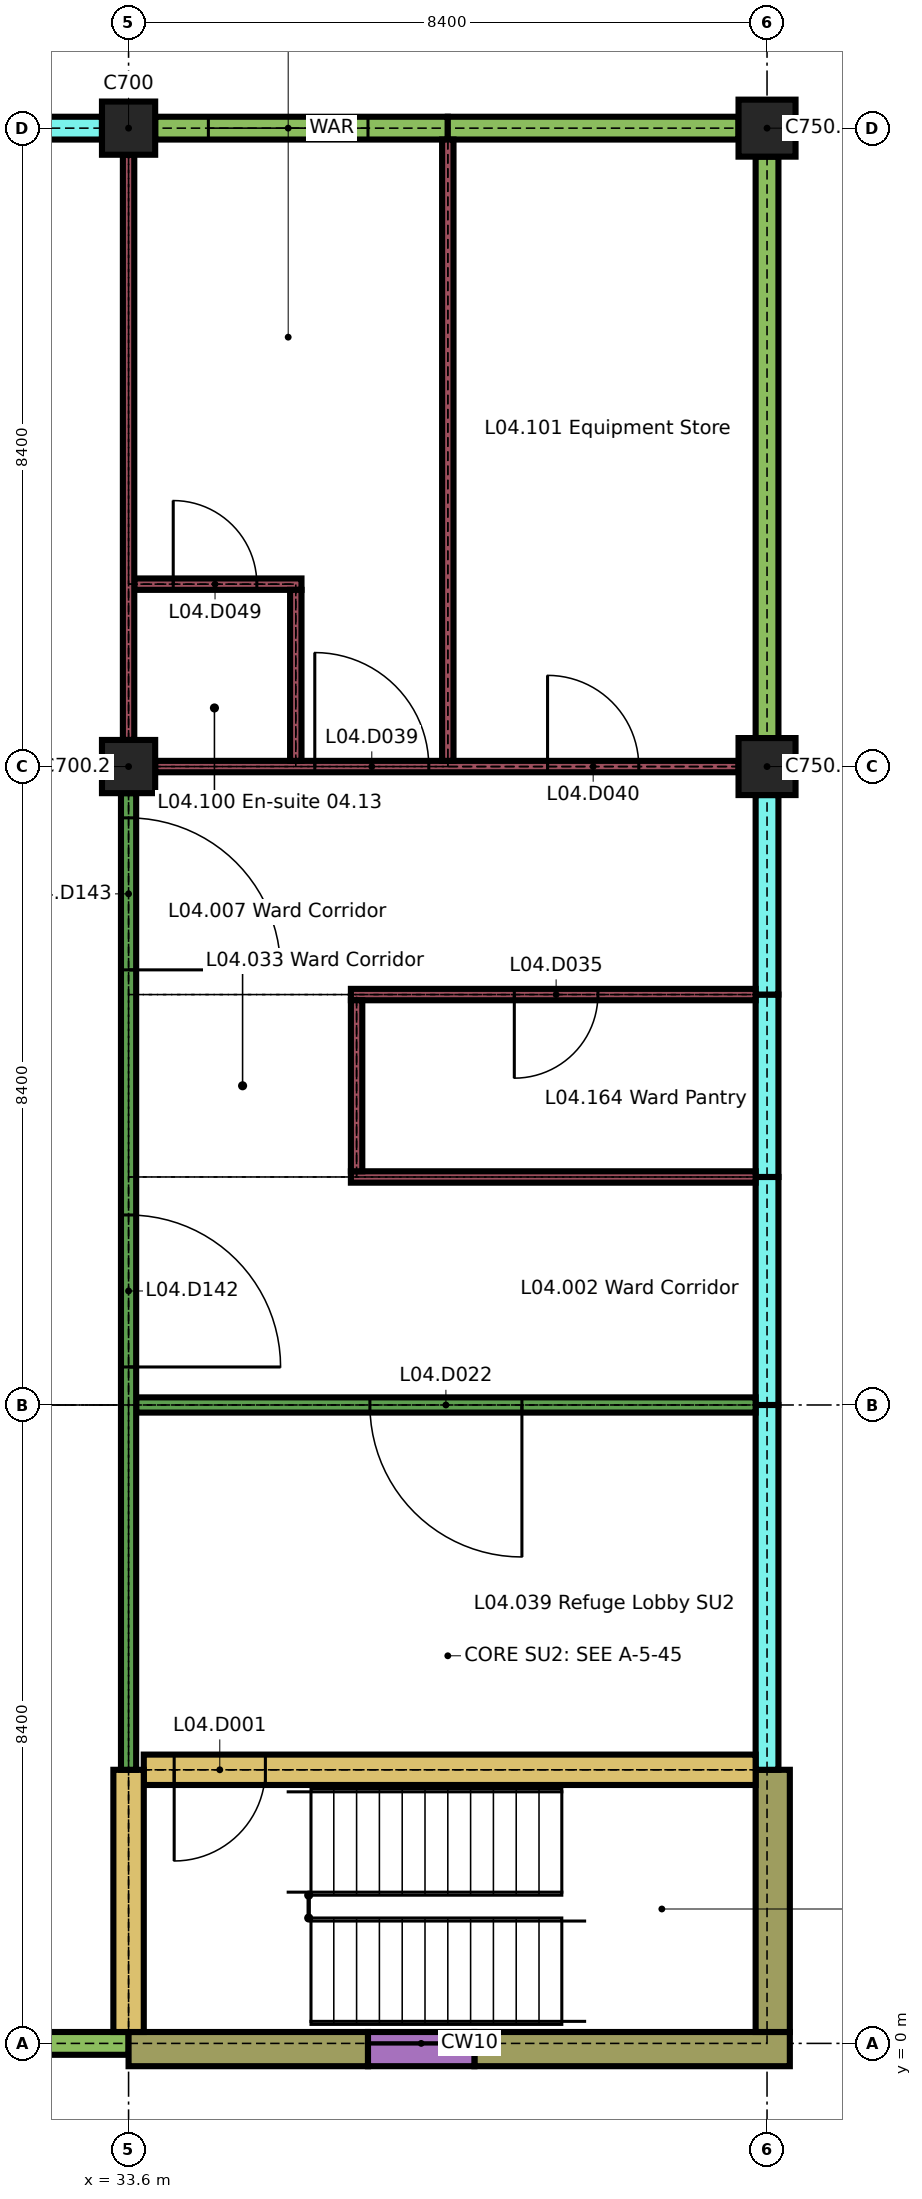
"""IFC4 building model, lengths in metres.
Left out: names, types, materials, properties, quantities, classifications, styles, units other than length and angle.
Written with IfcOpenShell. Run it as: python <this file> out.ifc"""

import sys

from ifc_helpers import new_model, si_unit, direction, frame, frame_2d, origin, origin_2d, place, context, subcontext, project, spatial, rectangle, extrude, element, fill, save


model = new_model("IFC4")
c1 = context("Model", 3, precision=1e-05, world=origin(), true_north=direction((0.0, 1.0)))
c2 = subcontext(c1, "Body", "Model", "MODEL_VIEW")
j1 = project(units=[si_unit("LENGTHUNIT", "METRE"), si_unit("PLANEANGLEUNIT", "RADIAN")], contexts=[c1])
p1 = place(None, origin())
s1 = spatial("IfcSite", under=j1, at=p1, CompositionType="ELEMENT")
p2 = place(p1, origin())
s2 = spatial("IfcBuilding", under=s1, at=p2, CompositionType="ELEMENT")
p3 = place(p2, frame((0.0, 0.0, 18.9)))
s3 = spatial("IfcBuildingStorey", under=s2, at=p3, CompositionType="ELEMENT", Elevation=18.9)
p4 = place(p3, frame((33.6, 16.8, 0.0), z_axis=(0.0, 0.0, 1.0), x_axis=(1.0, 0.0, 0.0)))
e1 = element("IfcColumn", 1, at=p4, inside=s3, PredefinedType="COLUMN", context=c2, shape_type="SweptSolid", body=[
    extrude(rectangle(XDim=0.7, YDim=0.7, at=origin_2d()), origin(), (0.0, 0.0, 1.0), 3.26),
])
p5 = place(p3, frame((42.0, 16.8, 0.0), z_axis=(0.0, 0.0, 1.0), x_axis=(1.0, 0.0, 0.0)))
e2 = element("IfcColumn", 2, at=p5, inside=s3, PredefinedType="COLUMN", context=c2, shape_type="SweptSolid", body=[
    extrude(rectangle(XDim=0.75, YDim=0.75, at=origin_2d()), origin(), (0.0, 0.0, 1.0), 3.26),
])
p6 = place(p3, frame((33.6, 25.2, 0.0), z_axis=(0.0, 0.0, 1.0), x_axis=(1.0, 0.0, 0.0)))
e3 = element("IfcColumn", 3, at=p6, inside=s3, PredefinedType="COLUMN", context=c2, shape_type="SweptSolid", body=[
    extrude(rectangle(XDim=0.7, YDim=0.7, at=origin_2d()), origin(), (0.0, 0.0, 1.0), 3.26),
])
p7 = place(p3, frame((42.0, 25.2, 0.0), z_axis=(0.0, 0.0, 1.0), x_axis=(1.0, 0.0, 0.0)))
e4 = element("IfcColumn", 4, at=p7, inside=s3, PredefinedType="COLUMN", context=c2, shape_type="SweptSolid", body=[
    extrude(rectangle(XDim=0.75, YDim=0.75, at=origin_2d()), origin(), (0.0, 0.0, 1.0), 3.26),
])
p8 = place(p3, frame((32.3, 0.0, 0.0), z_axis=(0.0, 0.0, 1.0), x_axis=(1.0, 0.0, 0.0)))
e5 = element("IfcWall", 5, at=p8, inside=s3, PredefinedType="SOLIDWALL", context=c2, shape_type="SweptSolid", body=[
    extrude(rectangle(XDim=1.3, YDim=0.3, at=frame_2d((0.65, 0.0))), origin(), (0.0, 0.0, 1.0), 2.96),
])
p9 = place(p3, frame((33.6, -0.075, 0.0), z_axis=(0.0, 0.0, 1.0), x_axis=(1.0, 0.0, 0.0)))
e6 = element("IfcWall", 6, at=p9, inside=s3, PredefinedType="SOLIDWALL", context=c2, shape_type="SweptSolid", body=[
    extrude(rectangle(XDim=3.15, YDim=0.45, at=frame_2d((1.575, 0.0))), origin(), (0.0, 0.0, 1.0), 3.26),
])
p10 = place(p3, frame((38.15, -0.075, 0.0), z_axis=(0.0, 0.0, 1.0), x_axis=(1.0, 0.0, 0.0)))
e7 = element("IfcWall", 7, at=p10, inside=s3, PredefinedType="SOLIDWALL", context=c2, shape_type="SweptSolid", body=[
    extrude(rectangle(XDim=4.15, YDim=0.45, at=frame_2d((2.075, 0.0))), origin(), (0.0, 0.0, 1.0), 3.26),
])
p11 = place(p3, frame((36.75, -0.075, 0.0), z_axis=(0.0, 0.0, 1.0), x_axis=(1.0, 0.0, 0.0)))
e8 = element("IfcWall", 8, at=p11, inside=s3, PredefinedType="SOLIDWALL", context=c2, shape_type="SweptSolid", body=[
    extrude(rectangle(XDim=1.4, YDim=0.45, at=frame_2d((0.7, 0.0))), origin(), (0.0, 0.0, 1.0), 0.6),
])
p12 = place(p3, frame((32.1, 25.2, 0.0), z_axis=(0.0, 0.0, 1.0), x_axis=(1.0, 0.0, 0.0)))
e9 = element("IfcWall", 9, at=p12, inside=s3, PredefinedType="SOLIDWALL", context=c2, shape_type="SweptSolid", body=[
    extrude(rectangle(XDim=1.15, YDim=0.3, at=frame_2d((0.575, 0.0))), origin(), (0.0, 0.0, 1.0), 3.26),
])
p13 = place(p3, frame((33.95, 25.2, 0.0), z_axis=(0.0, 0.0, 1.0), x_axis=(1.0, 0.0, 0.0)))
e10 = element("IfcWall", 10, at=p13, inside=s3, PredefinedType="SOLIDWALL", context=c2, shape_type="SweptSolid", body=[
    extrude(rectangle(XDim=3.85, YDim=0.3, at=frame_2d((1.925, 0.0))), origin(), (0.0, 0.0, 1.0), 2.96),
])
p14 = place(p13, frame((0.7, 0.0, 0.9)))
e11 = element("IfcOpeningElement", 11, at=p14, cuts=e10, PredefinedType="OPENING", context=c2, shape_type="SweptSolid", body=[
    extrude(rectangle(XDim=2.1, YDim=1.5, at=frame_2d((1.05, 0.75))), frame((0.0, 0.16, 0.0), z_axis=(0.0, -1.0, 0.0), x_axis=(1.0, 0.0, 0.0)), (0.0, 0.0, 1.0), 0.32),
])
p15 = place(p3, frame((37.8, 25.2, 0.0), z_axis=(0.0, 0.0, 1.0), x_axis=(1.0, 0.0, 0.0)))
e12 = element("IfcWall", 12, at=p15, inside=s3, PredefinedType="SOLIDWALL", context=c2, shape_type="SweptSolid", body=[
    extrude(rectangle(XDim=3.825, YDim=0.3, at=frame_2d((1.913, 0.0))), origin(), (0.0, 0.0, 1.0), 2.96),
])
p16 = place(p3, frame((42.075, 0.15, 0.0), z_axis=(0.0, 0.0, 1.0), x_axis=(0.0, 1.0, 0.0)))
e13 = element("IfcWall", 13, at=p16, inside=s3, PredefinedType="SOLIDWALL", context=c2, shape_type="SweptSolid", body=[
    extrude(rectangle(XDim=3.45, YDim=0.45, at=frame_2d((1.725, 0.0))), origin(), (0.0, 0.0, 1.0), 3.26),
])
p17 = place(p3, frame((42.0, 3.6, 0.0), z_axis=(0.0, 0.0, 1.0), x_axis=(0.0, 1.0, 0.0)))
e14 = element("IfcWall", 14, at=p17, inside=s3, PredefinedType="SOLIDWALL", context=c2, shape_type="SweptSolid", body=[
    extrude(rectangle(XDim=4.8, YDim=0.3, at=frame_2d((2.4, 0.0))), origin(), (0.0, 0.0, 1.0), 3.26),
])
p18 = place(p3, frame((42.0, 8.4, 0.0), z_axis=(0.0, 0.0, 1.0), x_axis=(0.0, 1.0, 0.0)))
e15 = element("IfcWall", 15, at=p18, inside=s3, PredefinedType="SOLIDWALL", context=c2, shape_type="SweptSolid", body=[
    extrude(rectangle(XDim=3.0, YDim=0.3, at=frame_2d((1.5, 0.0))), origin(), (0.0, 0.0, 1.0), 3.26),
])
p19 = place(p3, frame((42.0, 11.4, 0.0), z_axis=(0.0, 0.0, 1.0), x_axis=(0.0, 1.0, 0.0)))
e16 = element("IfcWall", 16, at=p19, inside=s3, PredefinedType="SOLIDWALL", context=c2, shape_type="SweptSolid", body=[
    extrude(rectangle(XDim=2.4, YDim=0.3, at=frame_2d((1.2, 0.0))), origin(), (0.0, 0.0, 1.0), 3.26),
])
p20 = place(p3, frame((42.0, 13.8, 0.0), z_axis=(0.0, 0.0, 1.0), x_axis=(0.0, 1.0, 0.0)))
e17 = element("IfcWall", 17, at=p20, inside=s3, PredefinedType="SOLIDWALL", context=c2, shape_type="SweptSolid", body=[
    extrude(rectangle(XDim=2.625, YDim=0.3, at=frame_2d((1.312, 0.0))), origin(), (0.0, 0.0, 1.0), 3.26),
])
p21 = place(p3, frame((42.0, 17.175, 0.0), z_axis=(0.0, 0.0, 1.0), x_axis=(0.0, 1.0, 0.0)))
e18 = element("IfcWall", 18, at=p21, inside=s3, PredefinedType="SOLIDWALL", context=c2, shape_type="SweptSolid", body=[
    extrude(rectangle(XDim=7.65, YDim=0.3, at=frame_2d((3.825, 0.0))), origin(), (0.0, 0.0, 1.0), 2.96),
])
p22 = place(p3, frame((33.8, 3.6, 0.0), z_axis=(0.0, 0.0, 1.0), x_axis=(1.0, 0.0, 0.0)))
e19 = element("IfcWall", 19, at=p22, inside=s3, PredefinedType="SHEAR", context=c2, shape_type="SweptSolid", body=[
    extrude(rectangle(XDim=8.05, YDim=0.4, at=frame_2d((4.025, 0.0))), origin(), (0.0, 0.0, 1.0), 3.26),
])
p23 = place(p22, frame((0.4, 0.0, 0.0)))
e20 = element("IfcOpeningElement", 20, at=p23, cuts=e19, PredefinedType="OPENING", context=c2, shape_type="SweptSolid", body=[
    extrude(rectangle(XDim=1.2, YDim=2.1, at=frame_2d((0.6, 1.05))), frame((0.0, 0.21, 0.0), z_axis=(0.0, -1.0, 0.0), x_axis=(1.0, 0.0, 0.0)), (0.0, 0.0, 1.0), 0.42),
])
p24 = place(p3, frame((33.7, 8.4, 0.0), z_axis=(0.0, 0.0, 1.0), x_axis=(1.0, 0.0, 0.0)))
e21 = element("IfcWall", 21, at=p24, inside=s3, PredefinedType="PARTITIONING", context=c2, shape_type="SweptSolid", body=[
    extrude(rectangle(XDim=8.15, YDim=0.2, at=frame_2d((4.075, 0.0))), origin(), (0.0, 0.0, 1.0), 3.26),
])
p25 = place(p24, frame((3.075, 0.0, 0.0)))
e22 = element("IfcOpeningElement", 22, at=p25, cuts=e21, PredefinedType="OPENING", context=c2, shape_type="SweptSolid", body=[
    extrude(rectangle(XDim=2.0, YDim=2.4, at=frame_2d((1.0, 1.2))), frame((0.0, 0.11, 0.0), z_axis=(0.0, -1.0, 0.0), x_axis=(1.0, 0.0, 0.0)), (0.0, 0.0, 1.0), 0.22),
])
p26 = place(p3, frame((36.525, 11.4, 0.0), z_axis=(0.0, 0.0, 1.0), x_axis=(1.0, 0.0, 0.0)))
e23 = element("IfcWall", 23, at=p26, inside=s3, PredefinedType="PARTITIONING", context=c2, shape_type="SweptSolid", body=[
    extrude(rectangle(XDim=5.325, YDim=0.15, at=frame_2d((2.663, 0.0))), origin(), (0.0, 0.0, 1.0), 3.26),
])
p27 = place(p3, frame((36.525, 13.8, 0.0), z_axis=(0.0, 0.0, 1.0), x_axis=(1.0, 0.0, 0.0)))
e24 = element("IfcWall", 24, at=p27, inside=s3, PredefinedType="PARTITIONING", context=c2, shape_type="SweptSolid", body=[
    extrude(rectangle(XDim=5.325, YDim=0.15, at=frame_2d((2.663, 0.0))), origin(), (0.0, 0.0, 1.0), 3.26),
])
p28 = place(p27, frame((2.15, 0.0, 0.0)))
e25 = element("IfcOpeningElement", 25, at=p28, cuts=e24, PredefinedType="OPENING", context=c2, shape_type="SweptSolid", body=[
    extrude(rectangle(XDim=1.1, YDim=2.1, at=frame_2d((0.55, 1.05))), frame((0.0, 0.085, 0.0), z_axis=(0.0, -1.0, 0.0), x_axis=(1.0, 0.0, 0.0)), (0.0, 0.0, 1.0), 0.17),
])
p29 = place(p3, frame((33.95, 16.8, 0.0), z_axis=(0.0, 0.0, 1.0), x_axis=(1.0, 0.0, 0.0)))
e26 = element("IfcWall", 26, at=p29, inside=s3, PredefinedType="PARTITIONING", context=c2, shape_type="SweptSolid", body=[
    extrude(rectangle(XDim=7.675, YDim=0.15, at=frame_2d((3.837, 0.0))), origin(), (0.0, 0.0, 1.0), 3.26),
])
p30 = place(p29, frame((2.1, 0.0, 0.0)))
e27 = element("IfcOpeningElement", 27, at=p30, cuts=e26, PredefinedType="OPENING", context=c2, shape_type="SweptSolid", body=[
    extrude(rectangle(XDim=1.5, YDim=2.4, at=frame_2d((0.75, 1.2))), frame((0.0, 0.085, 0.0), z_axis=(0.0, -1.0, 0.0), x_axis=(1.0, 0.0, 0.0)), (0.0, 0.0, 1.0), 0.17),
])
p31 = place(p29, frame((5.163, 0.0, 0.0)))
e28 = element("IfcOpeningElement", 28, at=p31, cuts=e26, PredefinedType="OPENING", context=c2, shape_type="SweptSolid", body=[
    extrude(rectangle(XDim=1.2, YDim=2.1, at=frame_2d((0.6, 1.05))), frame((0.0, 0.085, 0.0), z_axis=(0.0, -1.0, 0.0), x_axis=(1.0, 0.0, 0.0)), (0.0, 0.0, 1.0), 0.17),
])
p32 = place(p3, frame((33.675, 19.2, 0.0), z_axis=(0.0, 0.0, 1.0), x_axis=(1.0, 0.0, 0.0)))
e29 = element("IfcWall", 29, at=p32, inside=s3, PredefinedType="PARTITIONING", context=c2, shape_type="SweptSolid", body=[
    extrude(rectangle(XDim=2.2, YDim=0.15, at=frame_2d((1.1, 0.0))), origin(), (0.0, 0.0, 1.0), 3.26),
])
p33 = place(p32, frame((0.512, 0.0, 0.0)))
e30 = element("IfcOpeningElement", 30, at=p33, cuts=e29, PredefinedType="OPENING", context=c2, shape_type="SweptSolid", body=[
    extrude(rectangle(XDim=1.1, YDim=2.1, at=frame_2d((0.55, 1.05))), frame((0.0, 0.085, 0.0), z_axis=(0.0, -1.0, 0.0), x_axis=(1.0, 0.0, 0.0)), (0.0, 0.0, 1.0), 0.17),
])
p34 = place(p3, frame((33.6, 0.15, 0.0), z_axis=(0.0, 0.0, 1.0), x_axis=(0.0, 1.0, 0.0)))
e31 = element("IfcWall", 31, at=p34, inside=s3, PredefinedType="SHEAR", context=c2, shape_type="SweptSolid", body=[
    extrude(rectangle(XDim=3.45, YDim=0.4, at=frame_2d((1.725, 0.0))), origin(), (0.0, 0.0, 1.0), 3.26),
])
p35 = place(p3, frame((33.6, 3.6, 0.0), z_axis=(0.0, 0.0, 1.0), x_axis=(0.0, 1.0, 0.0)))
e32 = element("IfcWall", 32, at=p35, inside=s3, PredefinedType="PARTITIONING", context=c2, shape_type="SweptSolid", body=[
    extrude(rectangle(XDim=12.85, YDim=0.2, at=frame_2d((6.425, 0.0))), origin(), (0.0, 0.0, 1.0), 3.26),
])
p36 = place(p35, frame((5.3, 0.0, 0.0)))
e33 = element("IfcOpeningElement", 33, at=p36, cuts=e32, PredefinedType="OPENING", context=c2, shape_type="SweptSolid", body=[
    extrude(rectangle(XDim=2.0, YDim=2.4, at=frame_2d((1.0, 1.2))), frame((0.0, 0.11, 0.0), z_axis=(0.0, -1.0, 0.0), x_axis=(1.0, 0.0, 0.0)), (0.0, 0.0, 1.0), 0.22),
])
p37 = place(p35, frame((10.525, 0.0, 0.0)))
e34 = element("IfcOpeningElement", 34, at=p37, cuts=e32, PredefinedType="OPENING", context=c2, shape_type="SweptSolid", body=[
    extrude(rectangle(XDim=2.0, YDim=2.4, at=frame_2d((1.0, 1.2))), frame((0.0, 0.11, 0.0), z_axis=(0.0, -1.0, 0.0), x_axis=(1.0, 0.0, 0.0)), (0.0, 0.0, 1.0), 0.22),
])
p38 = place(p3, frame((33.6, 17.15, 0.0), z_axis=(0.0, 0.0, 1.0), x_axis=(0.0, 1.0, 0.0)))
e35 = element("IfcWall", 35, at=p38, inside=s3, PredefinedType="PARTITIONING", context=c2, shape_type="SweptSolid", body=[
    extrude(rectangle(XDim=7.7, YDim=0.15, at=frame_2d((3.85, 0.0))), origin(), (0.0, 0.0, 1.0), 3.26),
])
for number, where, z_axis, x_axis in (
    (36, (35.8, 16.875, 0.0), (0.0, 0.0, 1.0), (0.0, 1.0, 0.0)),
    (37, (36.6, 11.475, 0.0), (0.0, 0.0, 1.0), (0.0, 1.0, 0.0)),
):
    element("IfcWall", number, at=place(p3, frame(where, z_axis=z_axis, x_axis=x_axis)), inside=s3, PredefinedType="PARTITIONING", context=c2, shape_type="SweptSolid", body=[
        extrude(rectangle(XDim=2.25, YDim=0.15, at=frame_2d((1.125, 0.0))), origin(), (0.0, 0.0, 1.0), 3.26),
    ])
p39 = place(p3, frame((37.8, 16.875, 0.0), z_axis=(0.0, 0.0, 1.0), x_axis=(0.0, 1.0, 0.0)))
e38 = element("IfcWall", 38, at=p39, inside=s3, PredefinedType="PARTITIONING", context=c2, shape_type="SweptSolid", body=[
    extrude(rectangle(XDim=8.175, YDim=0.15, at=frame_2d((4.087, 0.0))), origin(), (0.0, 0.0, 1.0), 3.26),
])
p40 = place(p14, origin())
e39 = element("IfcWindow", 39, at=p40, inside=s3, PartitioningType="DOUBLE_PANEL_VERTICAL", PredefinedType="WINDOW", context=c2, shape_type="SweptSolid", body=[
    extrude(rectangle(XDim=2.1, YDim=1.5, at=frame_2d((1.05, 0.75))), frame((0.0, 0.05, 0.0), z_axis=(0.0, -1.0, 0.0), x_axis=(1.0, 0.0, 0.0)), (0.0, 0.0, 1.0), 0.1),
])
fill(e11, e39)
p41 = place(p23, origin())
e40 = element("IfcDoor", 40, at=p41, inside=s3, OperationType="SINGLE_SWING_LEFT", PredefinedType="DOOR", context=c2, shape_type="SweptSolid", body=[
    extrude(rectangle(XDim=1.2, YDim=2.1, at=frame_2d((0.6, 1.05))), frame((0.0, 0.025, 0.0), z_axis=(0.0, -1.0, 0.0), x_axis=(1.0, 0.0, 0.0)), (0.0, 0.0, 1.0), 0.05),
])
fill(e20, e40)
p42 = place(p25, origin())
e41 = element("IfcDoor", 41, at=p42, inside=s3, OperationType="SINGLE_SWING_RIGHT", PredefinedType="DOOR", context=c2, shape_type="SweptSolid", body=[
    extrude(rectangle(XDim=2.0, YDim=2.4, at=frame_2d((1.0, 1.2))), frame((0.0, 0.03, 0.0), z_axis=(0.0, -1.0, 0.0), x_axis=(1.0, 0.0, 0.0)), (0.0, 0.0, 1.0), 0.06),
])
fill(e22, e41)
p43 = place(p28, origin())
e42 = element("IfcDoor", 42, at=p43, inside=s3, OperationType="SINGLE_SWING_LEFT", PredefinedType="DOOR", context=c2, shape_type="SweptSolid", body=[
    extrude(rectangle(XDim=1.1, YDim=2.1, at=frame_2d((0.55, 1.05))), frame((0.0, 0.025, 0.0), z_axis=(0.0, -1.0, 0.0), x_axis=(1.0, 0.0, 0.0)), (0.0, 0.0, 1.0), 0.05),
])
fill(e25, e42)
p44 = place(p30, origin())
e43 = element("IfcDoor", 43, at=p44, inside=s3, OperationType="SINGLE_SWING_RIGHT", PredefinedType="DOOR", context=c2, shape_type="SweptSolid", body=[
    extrude(rectangle(XDim=1.5, YDim=2.4, at=frame_2d((0.75, 1.2))), frame((0.0, 0.03, 0.0), z_axis=(0.0, -1.0, 0.0), x_axis=(1.0, 0.0, 0.0)), (0.0, 0.0, 1.0), 0.06),
])
fill(e27, e43)
p45 = place(p31, origin())
e44 = element("IfcDoor", 44, at=p45, inside=s3, OperationType="SINGLE_SWING_RIGHT", PredefinedType="DOOR", context=c2, shape_type="SweptSolid", body=[
    extrude(rectangle(XDim=1.2, YDim=2.1, at=frame_2d((0.6, 1.05))), frame((0.0, 0.025, 0.0), z_axis=(0.0, -1.0, 0.0), x_axis=(1.0, 0.0, 0.0)), (0.0, 0.0, 1.0), 0.05),
])
fill(e28, e44)
p46 = place(p33, origin())
e45 = element("IfcDoor", 45, at=p46, inside=s3, OperationType="SINGLE_SWING_RIGHT", PredefinedType="DOOR", context=c2, shape_type="SweptSolid", body=[
    extrude(rectangle(XDim=1.1, YDim=2.1, at=frame_2d((0.55, 1.05))), frame((0.0, 0.025, 0.0), z_axis=(0.0, -1.0, 0.0), x_axis=(1.0, 0.0, 0.0)), (0.0, 0.0, 1.0), 0.05),
])
fill(e30, e45)
p47 = place(p36, origin())
e46 = element("IfcDoor", 46, at=p47, inside=s3, OperationType="SINGLE_SWING_LEFT", PredefinedType="DOOR", context=c2, shape_type="SweptSolid", body=[
    extrude(rectangle(XDim=2.0, YDim=2.4, at=frame_2d((1.0, 1.2))), frame((0.0, 0.03, 0.0), z_axis=(0.0, -1.0, 0.0), x_axis=(1.0, 0.0, 0.0)), (0.0, 0.0, 1.0), 0.06),
])
fill(e33, e46)
p48 = place(p37, origin())
e47 = element("IfcDoor", 47, at=p48, inside=s3, OperationType="SINGLE_SWING_LEFT", PredefinedType="DOOR", context=c2, shape_type="SweptSolid", body=[
    extrude(rectangle(XDim=2.0, YDim=2.4, at=frame_2d((1.0, 1.2))), frame((0.0, 0.03, 0.0), z_axis=(0.0, -1.0, 0.0), x_axis=(1.0, 0.0, 0.0)), (0.0, 0.0, 1.0), 0.06),
])
fill(e34, e47)
save(model, sys.argv[1])
